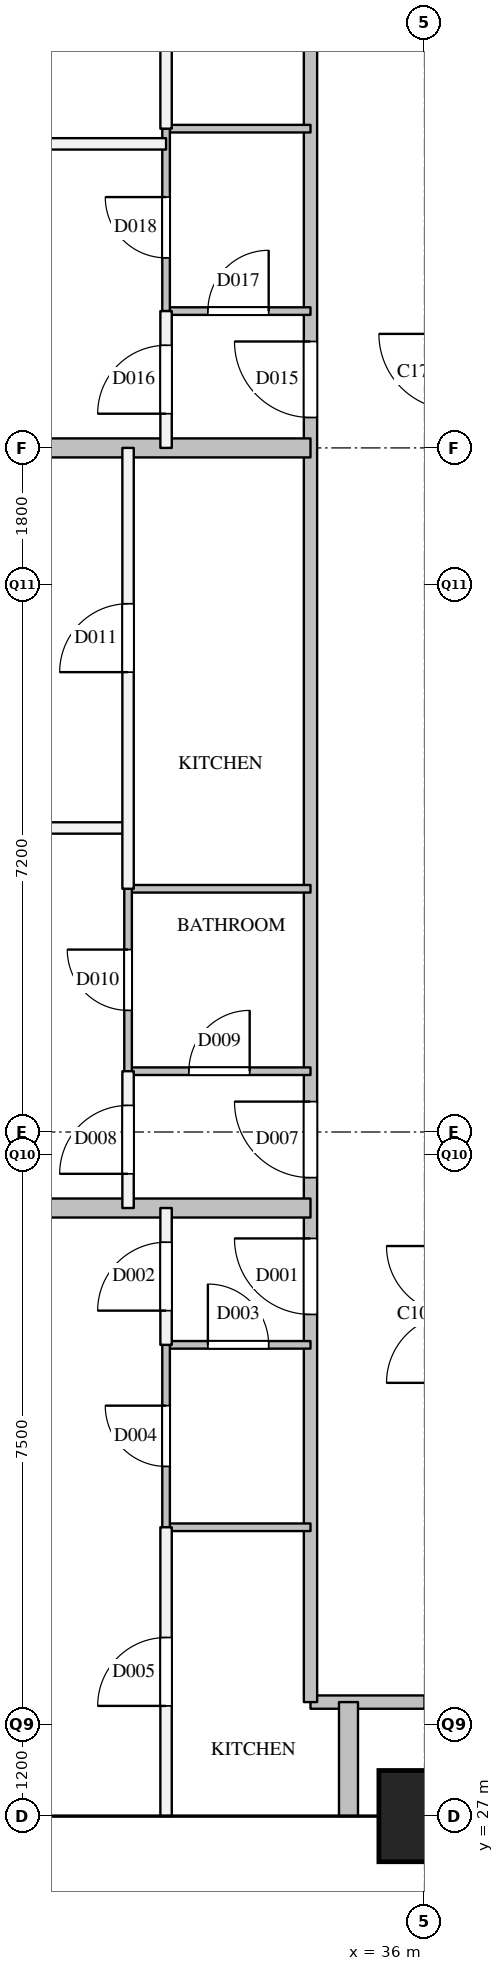
"""IFC4 building model, lengths in metres.
Left out: names, types, materials, properties, quantities, classifications, styles, units other than length and angle.
Written with IfcOpenShell. Run it as: python <this file> out.ifc"""

import sys

from ifc_helpers import new_model, si_unit, direction, frame, frame_2d, origin, origin_2d, place, context, subcontext, project, spatial, rectangle, extrude, element, fill, save


model = new_model("IFC4")
c1 = context("Model", 3, precision=1e-05, world=origin(), true_north=direction((0.0, 1.0)))
c2 = subcontext(c1, "Body", "Model", "MODEL_VIEW")
j1 = project(units=[si_unit("LENGTHUNIT", "METRE"), si_unit("PLANEANGLEUNIT", "RADIAN")], contexts=[c1])
p1 = place(None, origin())
s1 = spatial("IfcSite", under=j1, at=p1, CompositionType="ELEMENT")
p2 = place(p1, origin())
s2 = spatial("IfcBuilding", under=s1, at=p2, CompositionType="ELEMENT")
p3 = place(p2, frame((0.0, 0.0, 242.3)))
s3 = spatial("IfcBuildingStorey", under=s2, at=p3, CompositionType="ELEMENT", Elevation=242.3)
p4 = place(p3, frame((36.0, 27.0, 0.0), z_axis=(0.0, 0.0, 1.0), x_axis=(1.0, 0.0, 0.0)))
e1 = element("IfcColumn", 1, at=p4, inside=s3, PredefinedType="COLUMN", context=c2, shape_type="SweptSolid", body=[
    extrude(rectangle(XDim=1.2, YDim=1.2, at=origin_2d()), origin(), (0.0, 0.0, 1.0), 3.9),
])
p5 = place(p3, frame((34.5, 28.5, 0.0), z_axis=(0.0, 0.0, 1.0), x_axis=(1.0, 0.0, 0.0)))
e2 = element("IfcWall", 2, at=p5, inside=s3, PredefinedType="PARTITIONING", context=c2, shape_type="SweptSolid", body=[
    extrude(rectangle(XDim=1.5, YDim=0.175, at=frame_2d((0.75, 0.0))), origin(), (0.0, 0.0, 1.0), 3.6),
])
p6 = place(p3, frame((34.5, 28.5, 0.0), z_axis=(0.0, 0.0, 1.0), x_axis=(0.0, 1.0, 0.0)))
e3 = element("IfcWall", 3, at=p6, inside=s3, PredefinedType="PARTITIONING", context=c2, shape_type="SweptSolid", body=[
    extrude(rectangle(XDim=23.0, YDim=0.175, at=frame_2d((11.5, 0.0))), origin(), (0.0, 0.0, 1.0), 3.6),
])
p7 = place(p6, frame((5.1, 0.0, 0.0)))
e4 = element("IfcOpeningElement", 4, at=p7, cuts=e3, PredefinedType="OPENING", context=c2, shape_type="SweptSolid", body=[
    extrude(rectangle(XDim=1.0, YDim=2.1, at=frame_2d((0.5, 1.05))), frame((0.0, 0.097, 0.0), z_axis=(0.0, -1.0, 0.0), x_axis=(1.0, 0.0, 0.0)), (0.0, 0.0, 1.0), 0.195),
])
p8 = place(p6, frame((6.9, 0.0, 0.0)))
e5 = element("IfcOpeningElement", 5, at=p8, cuts=e3, PredefinedType="OPENING", context=c2, shape_type="SweptSolid", body=[
    extrude(rectangle(XDim=1.0, YDim=2.1, at=frame_2d((0.5, 1.05))), frame((0.0, 0.097, 0.0), z_axis=(0.0, -1.0, 0.0), x_axis=(1.0, 0.0, 0.0)), (0.0, 0.0, 1.0), 0.195),
])
p9 = place(p6, frame((16.9, 0.0, 0.0)))
e6 = element("IfcOpeningElement", 6, at=p9, cuts=e3, PredefinedType="OPENING", context=c2, shape_type="SweptSolid", body=[
    extrude(rectangle(XDim=1.0, YDim=2.1, at=frame_2d((0.5, 1.05))), frame((0.0, 0.097, 0.0), z_axis=(0.0, -1.0, 0.0), x_axis=(1.0, 0.0, 0.0)), (0.0, 0.0, 1.0), 0.195),
])
p10 = place(p3, frame((18.0, 40.0, 0.0), z_axis=(0.0, 0.0, 1.0), x_axis=(1.0, 0.0, 0.0)))
e7 = element("IfcWall", 7, at=p10, inside=s3, PredefinedType="PARTITIONING", context=c2, shape_type="SweptSolid", body=[
    extrude(rectangle(XDim=14.1, YDim=0.15, at=frame_2d((7.05, 0.0))), origin(), (0.0, 0.0, 1.0), 2.6),
])
p11 = place(p10, frame((9.914, 0.0, 0.0)))
e8 = element("IfcOpeningElement", 8, at=p11, cuts=e7, PredefinedType="OPENING", context=c2, shape_type="SweptSolid", body=[
    extrude(rectangle(XDim=0.9, YDim=2.1, at=frame_2d((0.45, 1.05))), frame((0.0, 0.085, 0.0), z_axis=(0.0, -1.0, 0.0), x_axis=(1.0, 0.0, 0.0)), (0.0, 0.0, 1.0), 0.17),
])
p12 = place(p10, frame((2.864, 0.0, 0.0)))
e9 = element("IfcOpeningElement", 9, at=p12, cuts=e7, PredefinedType="OPENING", context=c2, shape_type="SweptSolid", body=[
    extrude(rectangle(XDim=0.9, YDim=2.1, at=frame_2d((0.45, 1.05))), frame((0.0, 0.085, 0.0), z_axis=(0.0, -1.0, 0.0), x_axis=(1.0, 0.0, 0.0)), (0.0, 0.0, 1.0), 0.17),
])
p13 = place(p3, frame((18.0, 49.0, 0.0), z_axis=(0.0, 0.0, 1.0), x_axis=(1.0, 0.0, 0.0)))
e10 = element("IfcWall", 10, at=p13, inside=s3, PredefinedType="PARTITIONING", context=c2, shape_type="SweptSolid", body=[
    extrude(rectangle(XDim=14.6, YDim=0.15, at=frame_2d((7.3, 0.0))), origin(), (0.0, 0.0, 1.0), 2.6),
])
p14 = place(p13, frame((10.533, 0.0, 0.0)))
e11 = element("IfcOpeningElement", 11, at=p14, cuts=e10, PredefinedType="OPENING", context=c2, shape_type="SweptSolid", body=[
    extrude(rectangle(XDim=0.9, YDim=2.1, at=frame_2d((0.45, 1.05))), frame((0.0, 0.085, 0.0), z_axis=(0.0, -1.0, 0.0), x_axis=(1.0, 0.0, 0.0)), (0.0, 0.0, 1.0), 0.17),
])
p15 = place(p13, frame((3.233, 0.0, 0.0)))
e12 = element("IfcOpeningElement", 12, at=p15, cuts=e10, PredefinedType="OPENING", context=c2, shape_type="SweptSolid", body=[
    extrude(rectangle(XDim=0.9, YDim=2.1, at=frame_2d((0.45, 1.05))), frame((0.0, 0.085, 0.0), z_axis=(0.0, -1.0, 0.0), x_axis=(1.0, 0.0, 0.0)), (0.0, 0.0, 1.0), 0.17),
])
p16 = place(p3, frame((32.1, 35.0, 0.0), z_axis=(0.0, 0.0, 1.0), x_axis=(0.0, 1.0, 0.0)))
e13 = element("IfcWall", 13, at=p16, inside=s3, PredefinedType="PARTITIONING", context=c2, shape_type="SweptSolid", body=[
    extrude(rectangle(XDim=1.8, YDim=0.15, at=frame_2d((0.9, 0.0))), origin(), (0.0, 0.0, 1.0), 3.6),
])
p17 = place(p16, frame((0.45, 0.0, 0.0)))
e14 = element("IfcOpeningElement", 14, at=p17, cuts=e13, PredefinedType="OPENING", context=c2, shape_type="SweptSolid", body=[
    extrude(rectangle(XDim=0.9, YDim=2.1, at=frame_2d((0.45, 1.05))), frame((0.0, 0.085, 0.0), z_axis=(0.0, -1.0, 0.0), x_axis=(1.0, 0.0, 0.0)), (0.0, 0.0, 1.0), 0.17),
])
p18 = place(p3, frame((32.1, 39.2, 0.0), z_axis=(0.0, 0.0, 1.0), x_axis=(0.0, 1.0, 0.0)))
e15 = element("IfcWall", 15, at=p18, inside=s3, PredefinedType="PARTITIONING", context=c2, shape_type="SweptSolid", body=[
    extrude(rectangle(XDim=5.8, YDim=0.15, at=frame_2d((2.9, 0.0))), origin(), (0.0, 0.0, 1.0), 3.6),
])
p19 = place(p18, frame((2.85, 0.0, 0.0)))
e16 = element("IfcOpeningElement", 16, at=p19, cuts=e15, PredefinedType="OPENING", context=c2, shape_type="SweptSolid", body=[
    extrude(rectangle(XDim=0.9, YDim=2.1, at=frame_2d((0.45, 1.05))), frame((0.0, 0.085, 0.0), z_axis=(0.0, -1.0, 0.0), x_axis=(1.0, 0.0, 0.0)), (0.0, 0.0, 1.0), 0.17),
])
p20 = place(p3, frame((32.6, 27.0, 0.0), z_axis=(0.0, 0.0, 1.0), x_axis=(0.0, 1.0, 0.0)))
e17 = element("IfcWall", 17, at=p20, inside=s3, PredefinedType="PARTITIONING", context=c2, shape_type="SweptSolid", body=[
    extrude(rectangle(XDim=3.8, YDim=0.15, at=frame_2d((1.9, 0.0))), origin(), (0.0, 0.0, 1.0), 2.6),
])
p21 = place(p20, frame((1.45, 0.0, 0.0)))
e18 = element("IfcOpeningElement", 18, at=p21, cuts=e17, PredefinedType="OPENING", context=c2, shape_type="SweptSolid", body=[
    extrude(rectangle(XDim=0.9, YDim=2.1, at=frame_2d((0.45, 1.05))), frame((0.0, 0.085, 0.0), z_axis=(0.0, -1.0, 0.0), x_axis=(1.0, 0.0, 0.0)), (0.0, 0.0, 1.0), 0.17),
])
p22 = place(p3, frame((32.6, 33.2, 0.0), z_axis=(0.0, 0.0, 1.0), x_axis=(0.0, 1.0, 0.0)))
e19 = element("IfcWall", 19, at=p22, inside=s3, PredefinedType="PARTITIONING", context=c2, shape_type="SweptSolid", body=[
    extrude(rectangle(XDim=1.8, YDim=0.15, at=frame_2d((0.9, 0.0))), origin(), (0.0, 0.0, 1.0), 3.6),
])
p23 = place(p22, frame((0.45, 0.0, 0.0)))
e20 = element("IfcOpeningElement", 20, at=p23, cuts=e19, PredefinedType="OPENING", context=c2, shape_type="SweptSolid", body=[
    extrude(rectangle(XDim=0.9, YDim=2.1, at=frame_2d((0.45, 1.05))), frame((0.0, 0.085, 0.0), z_axis=(0.0, -1.0, 0.0), x_axis=(1.0, 0.0, 0.0)), (0.0, 0.0, 1.0), 0.17),
])
p24 = place(p3, frame((32.6, 45.0, 0.0), z_axis=(0.0, 0.0, 1.0), x_axis=(0.0, 1.0, 0.0)))
e21 = element("IfcWall", 21, at=p24, inside=s3, PredefinedType="PARTITIONING", context=c2, shape_type="SweptSolid", body=[
    extrude(rectangle(XDim=1.8, YDim=0.15, at=frame_2d((0.9, 0.0))), origin(), (0.0, 0.0, 1.0), 3.6),
])
p25 = place(p24, frame((0.45, 0.0, 0.0)))
e22 = element("IfcOpeningElement", 22, at=p25, cuts=e21, PredefinedType="OPENING", context=c2, shape_type="SweptSolid", body=[
    extrude(rectangle(XDim=0.9, YDim=2.1, at=frame_2d((0.45, 1.05))), frame((0.0, 0.085, 0.0), z_axis=(0.0, -1.0, 0.0), x_axis=(1.0, 0.0, 0.0)), (0.0, 0.0, 1.0), 0.17),
])
p26 = place(p3, frame((32.6, 49.2, 0.0), z_axis=(0.0, 0.0, 1.0), x_axis=(0.0, 1.0, 0.0)))
e23 = element("IfcWall", 23, at=p26, inside=s3, PredefinedType="PARTITIONING", context=c2, shape_type="SweptSolid", body=[
    extrude(rectangle(XDim=4.8, YDim=0.15, at=frame_2d((2.4, 0.0))), origin(), (0.0, 0.0, 1.0), 2.6),
])
p27 = place(p26, frame((1.95, 0.0, 0.0)))
e24 = element("IfcOpeningElement", 24, at=p27, cuts=e23, PredefinedType="OPENING", context=c2, shape_type="SweptSolid", body=[
    extrude(rectangle(XDim=0.9, YDim=2.1, at=frame_2d((0.45, 1.05))), frame((0.0, 0.085, 0.0), z_axis=(0.0, -1.0, 0.0), x_axis=(1.0, 0.0, 0.0)), (0.0, 0.0, 1.0), 0.17),
])
p28 = place(p3, frame((18.0, 35.0, 0.0), z_axis=(0.0, 0.0, 1.0), x_axis=(1.0, 0.0, 0.0)))
e25 = element("IfcWall", 25, at=p28, inside=s3, PredefinedType="PARTITIONING", context=c2, shape_type="SweptSolid", body=[
    extrude(rectangle(XDim=16.5, YDim=0.25, at=frame_2d((8.25, 0.0))), origin(), (0.0, 0.0, 1.0), 2.6),
])
p29 = place(p3, frame((18.0, 45.0, 0.0), z_axis=(0.0, 0.0, 1.0), x_axis=(1.0, 0.0, 0.0)))
e26 = element("IfcWall", 26, at=p29, inside=s3, PredefinedType="PARTITIONING", context=c2, shape_type="SweptSolid", body=[
    extrude(rectangle(XDim=16.5, YDim=0.25, at=frame_2d((8.25, 0.0))), origin(), (0.0, 0.0, 1.0), 3.6),
])
p30 = place(p3, frame((35.0, 27.0, 0.0), z_axis=(0.0, 0.0, 1.0), x_axis=(0.0, 1.0, 0.0)))
e27 = element("IfcWall", 27, at=p30, inside=s3, PredefinedType="PARTITIONING", context=c2, shape_type="SweptSolid", body=[
    extrude(rectangle(XDim=1.5, YDim=0.25, at=frame_2d((0.75, 0.0))), origin(), (0.0, 0.0, 1.0), 2.6),
])
p31 = place(p3, frame((32.6, 30.8, 0.0), z_axis=(0.0, 0.0, 1.0), x_axis=(1.0, 0.0, 0.0)))
e28 = element("IfcWall", 28, at=p31, inside=s3, PredefinedType="PARTITIONING", context=c2, shape_type="SweptSolid", body=[
    extrude(rectangle(XDim=1.9, YDim=0.1, at=frame_2d((0.95, 0.0))), origin(), (0.0, 0.0, 1.0), 3.6),
])
p32 = place(p3, frame((32.6, 33.2, 0.0), z_axis=(0.0, 0.0, 1.0), x_axis=(1.0, 0.0, 0.0)))
e29 = element("IfcWall", 29, at=p32, inside=s3, PredefinedType="PARTITIONING", context=c2, shape_type="SweptSolid", body=[
    extrude(rectangle(XDim=1.9, YDim=0.1, at=frame_2d((0.95, 0.0))), origin(), (0.0, 0.0, 1.0), 3.6),
])
p33 = place(p32, frame((0.55, 0.0, 0.0)))
e30 = element("IfcOpeningElement", 30, at=p33, cuts=e29, PredefinedType="OPENING", context=c2, shape_type="SweptSolid", body=[
    extrude(rectangle(XDim=0.8, YDim=2.1, at=frame_2d((0.4, 1.05))), frame((0.0, 0.06, 0.0), z_axis=(0.0, -1.0, 0.0), x_axis=(1.0, 0.0, 0.0)), (0.0, 0.0, 1.0), 0.12),
])
p34 = place(p3, frame((32.1, 36.8, 0.0), z_axis=(0.0, 0.0, 1.0), x_axis=(1.0, 0.0, 0.0)))
e31 = element("IfcWall", 31, at=p34, inside=s3, PredefinedType="PARTITIONING", context=c2, shape_type="SweptSolid", body=[
    extrude(rectangle(XDim=2.4, YDim=0.1, at=frame_2d((1.2, 0.0))), origin(), (0.0, 0.0, 1.0), 3.6),
])
p35 = place(p34, frame((0.8, 0.0, 0.0)))
e32 = element("IfcOpeningElement", 32, at=p35, cuts=e31, PredefinedType="OPENING", context=c2, shape_type="SweptSolid", body=[
    extrude(rectangle(XDim=0.8, YDim=2.1, at=frame_2d((0.4, 1.05))), frame((0.0, 0.06, 0.0), z_axis=(0.0, -1.0, 0.0), x_axis=(1.0, 0.0, 0.0)), (0.0, 0.0, 1.0), 0.12),
])
p36 = place(p3, frame((32.1, 39.2, 0.0), z_axis=(0.0, 0.0, 1.0), x_axis=(1.0, 0.0, 0.0)))
e33 = element("IfcWall", 33, at=p36, inside=s3, PredefinedType="PARTITIONING", context=c2, shape_type="SweptSolid", body=[
    extrude(rectangle(XDim=2.4, YDim=0.1, at=frame_2d((1.2, 0.0))), origin(), (0.0, 0.0, 1.0), 3.6),
])
p37 = place(p3, frame((32.6, 46.8, 0.0), z_axis=(0.0, 0.0, 1.0), x_axis=(1.0, 0.0, 0.0)))
e34 = element("IfcWall", 34, at=p37, inside=s3, PredefinedType="PARTITIONING", context=c2, shape_type="SweptSolid", body=[
    extrude(rectangle(XDim=1.9, YDim=0.1, at=frame_2d((0.95, 0.0))), origin(), (0.0, 0.0, 1.0), 3.6),
])
p38 = place(p37, frame((0.55, 0.0, 0.0)))
e35 = element("IfcOpeningElement", 35, at=p38, cuts=e34, PredefinedType="OPENING", context=c2, shape_type="SweptSolid", body=[
    extrude(rectangle(XDim=0.8, YDim=2.1, at=frame_2d((0.4, 1.05))), frame((0.0, 0.06, 0.0), z_axis=(0.0, -1.0, 0.0), x_axis=(1.0, 0.0, 0.0)), (0.0, 0.0, 1.0), 0.12),
])
p39 = place(p3, frame((32.6, 49.2, 0.0), z_axis=(0.0, 0.0, 1.0), x_axis=(1.0, 0.0, 0.0)))
e36 = element("IfcWall", 36, at=p39, inside=s3, PredefinedType="PARTITIONING", context=c2, shape_type="SweptSolid", body=[
    extrude(rectangle(XDim=1.9, YDim=0.1, at=frame_2d((0.95, 0.0))), origin(), (0.0, 0.0, 1.0), 3.6),
])
p40 = place(p3, frame((32.1, 36.8, 0.0), z_axis=(0.0, 0.0, 1.0), x_axis=(0.0, 1.0, 0.0)))
e37 = element("IfcWall", 37, at=p40, inside=s3, PredefinedType="PARTITIONING", context=c2, shape_type="SweptSolid", body=[
    extrude(rectangle(XDim=2.4, YDim=0.1, at=frame_2d((1.2, 0.0))), origin(), (0.0, 0.0, 1.0), 3.6),
])
p41 = place(p40, frame((0.8, 0.0, 0.0)))
e38 = element("IfcOpeningElement", 38, at=p41, cuts=e37, PredefinedType="OPENING", context=c2, shape_type="SweptSolid", body=[
    extrude(rectangle(XDim=0.8, YDim=2.1, at=frame_2d((0.4, 1.05))), frame((0.0, 0.06, 0.0), z_axis=(0.0, -1.0, 0.0), x_axis=(1.0, 0.0, 0.0)), (0.0, 0.0, 1.0), 0.12),
])
p42 = place(p3, frame((32.6, 30.8, 0.0), z_axis=(0.0, 0.0, 1.0), x_axis=(0.0, 1.0, 0.0)))
e39 = element("IfcWall", 39, at=p42, inside=s3, PredefinedType="PARTITIONING", context=c2, shape_type="SweptSolid", body=[
    extrude(rectangle(XDim=2.4, YDim=0.1, at=frame_2d((1.2, 0.0))), origin(), (0.0, 0.0, 1.0), 3.6),
])
p43 = place(p42, frame((0.8, 0.0, 0.0)))
e40 = element("IfcOpeningElement", 40, at=p43, cuts=e39, PredefinedType="OPENING", context=c2, shape_type="SweptSolid", body=[
    extrude(rectangle(XDim=0.8, YDim=2.1, at=frame_2d((0.4, 1.05))), frame((0.0, 0.06, 0.0), z_axis=(0.0, -1.0, 0.0), x_axis=(1.0, 0.0, 0.0)), (0.0, 0.0, 1.0), 0.12),
])
p44 = place(p3, frame((32.6, 46.8, 0.0), z_axis=(0.0, 0.0, 1.0), x_axis=(0.0, 1.0, 0.0)))
e41 = element("IfcWall", 41, at=p44, inside=s3, PredefinedType="PARTITIONING", context=c2, shape_type="SweptSolid", body=[
    extrude(rectangle(XDim=2.4, YDim=0.1, at=frame_2d((1.2, 0.0))), origin(), (0.0, 0.0, 1.0), 3.6),
])
p45 = place(p44, frame((0.7, 0.0, 0.0)))
e42 = element("IfcOpeningElement", 42, at=p45, cuts=e41, PredefinedType="OPENING", context=c2, shape_type="SweptSolid", body=[
    extrude(rectangle(XDim=0.8, YDim=2.1, at=frame_2d((0.4, 1.05))), frame((0.0, 0.06, 0.0), z_axis=(0.0, -1.0, 0.0), x_axis=(1.0, 0.0, 0.0)), (0.0, 0.0, 1.0), 0.12),
])
p46 = place(p7, origin())
e43 = element("IfcDoor", 43, at=p46, inside=s3, OperationType="SINGLE_SWING_RIGHT", PredefinedType="DOOR", context=c2, shape_type="SweptSolid", body=[
    extrude(rectangle(XDim=1.0, YDim=2.1, at=frame_2d((0.5, 1.05))), frame((0.0, 0.025, 0.0), z_axis=(0.0, -1.0, 0.0), x_axis=(1.0, 0.0, 0.0)), (0.0, 0.0, 1.0), 0.05),
])
fill(e4, e43)
p47 = place(p23, origin())
e44 = element("IfcDoor", 44, at=p47, inside=s3, OperationType="SINGLE_SWING_LEFT", PredefinedType="DOOR", context=c2, shape_type="SweptSolid", body=[
    extrude(rectangle(XDim=0.9, YDim=2.1, at=frame_2d((0.45, 1.05))), frame((0.0, 0.025, 0.0), z_axis=(0.0, -1.0, 0.0), x_axis=(1.0, 0.0, 0.0)), (0.0, 0.0, 1.0), 0.05),
])
fill(e20, e44)
p48 = place(p33, origin())
e45 = element("IfcDoor", 45, at=p48, inside=s3, OperationType="SINGLE_SWING_LEFT", PredefinedType="DOOR", context=c2, shape_type="SweptSolid", body=[
    extrude(rectangle(XDim=0.8, YDim=2.1, at=frame_2d((0.4, 1.05))), frame((0.0, 0.025, 0.0), z_axis=(0.0, -1.0, 0.0), x_axis=(1.0, 0.0, 0.0)), (0.0, 0.0, 1.0), 0.05),
])
fill(e30, e45)
p49 = place(p43, origin())
e46 = element("IfcDoor", 46, at=p49, inside=s3, OperationType="SINGLE_SWING_RIGHT", PredefinedType="DOOR", context=c2, shape_type="SweptSolid", body=[
    extrude(rectangle(XDim=0.8, YDim=2.1, at=frame_2d((0.4, 1.05))), frame((0.0, 0.025, 0.0), z_axis=(0.0, -1.0, 0.0), x_axis=(1.0, 0.0, 0.0)), (0.0, 0.0, 1.0), 0.05),
])
fill(e40, e46)
p50 = place(p21, origin())
e47 = element("IfcDoor", 47, at=p50, inside=s3, OperationType="SINGLE_SWING_LEFT", PredefinedType="DOOR", context=c2, shape_type="SweptSolid", body=[
    extrude(rectangle(XDim=0.9, YDim=2.1, at=frame_2d((0.45, 1.05))), frame((0.0, 0.025, 0.0), z_axis=(0.0, -1.0, 0.0), x_axis=(1.0, 0.0, 0.0)), (0.0, 0.0, 1.0), 0.05),
])
fill(e18, e47)
p51 = place(p8, origin())
e48 = element("IfcDoor", 48, at=p51, inside=s3, OperationType="SINGLE_SWING_RIGHT", PredefinedType="DOOR", context=c2, shape_type="SweptSolid", body=[
    extrude(rectangle(XDim=1.0, YDim=2.1, at=frame_2d((0.5, 1.05))), frame((0.0, 0.025, 0.0), z_axis=(0.0, -1.0, 0.0), x_axis=(1.0, 0.0, 0.0)), (0.0, 0.0, 1.0), 0.05),
])
fill(e5, e48)
p52 = place(p17, origin())
e49 = element("IfcDoor", 49, at=p52, inside=s3, OperationType="SINGLE_SWING_LEFT", PredefinedType="DOOR", context=c2, shape_type="SweptSolid", body=[
    extrude(rectangle(XDim=0.9, YDim=2.1, at=frame_2d((0.45, 1.05))), frame((0.0, 0.025, 0.0), z_axis=(0.0, -1.0, 0.0), x_axis=(1.0, 0.0, 0.0)), (0.0, 0.0, 1.0), 0.05),
])
fill(e14, e49)
p53 = place(p35, origin())
e50 = element("IfcDoor", 50, at=p53, inside=s3, OperationType="SINGLE_SWING_RIGHT", PredefinedType="DOOR", context=c2, shape_type="SweptSolid", body=[
    extrude(rectangle(XDim=0.8, YDim=2.1, at=frame_2d((0.4, 1.05))), frame((0.0, 0.025, 0.0), z_axis=(0.0, -1.0, 0.0), x_axis=(1.0, 0.0, 0.0)), (0.0, 0.0, 1.0), 0.05),
])
fill(e32, e50)
p54 = place(p41, origin())
e51 = element("IfcDoor", 51, at=p54, inside=s3, OperationType="SINGLE_SWING_RIGHT", PredefinedType="DOOR", context=c2, shape_type="SweptSolid", body=[
    extrude(rectangle(XDim=0.8, YDim=2.1, at=frame_2d((0.4, 1.05))), frame((0.0, 0.025, 0.0), z_axis=(0.0, -1.0, 0.0), x_axis=(1.0, 0.0, 0.0)), (0.0, 0.0, 1.0), 0.05),
])
fill(e38, e51)
p55 = place(p19, origin())
e52 = element("IfcDoor", 52, at=p55, inside=s3, OperationType="SINGLE_SWING_LEFT", PredefinedType="DOOR", context=c2, shape_type="SweptSolid", body=[
    extrude(rectangle(XDim=0.9, YDim=2.1, at=frame_2d((0.45, 1.05))), frame((0.0, 0.025, 0.0), z_axis=(0.0, -1.0, 0.0), x_axis=(1.0, 0.0, 0.0)), (0.0, 0.0, 1.0), 0.05),
])
fill(e16, e52)
p56 = place(p9, origin())
e53 = element("IfcDoor", 53, at=p56, inside=s3, OperationType="SINGLE_SWING_RIGHT", PredefinedType="DOOR", context=c2, shape_type="SweptSolid", body=[
    extrude(rectangle(XDim=1.0, YDim=2.1, at=frame_2d((0.5, 1.05))), frame((0.0, 0.025, 0.0), z_axis=(0.0, -1.0, 0.0), x_axis=(1.0, 0.0, 0.0)), (0.0, 0.0, 1.0), 0.05),
])
fill(e6, e53)
p57 = place(p25, origin())
e54 = element("IfcDoor", 54, at=p57, inside=s3, OperationType="SINGLE_SWING_LEFT", PredefinedType="DOOR", context=c2, shape_type="SweptSolid", body=[
    extrude(rectangle(XDim=0.9, YDim=2.1, at=frame_2d((0.45, 1.05))), frame((0.0, 0.025, 0.0), z_axis=(0.0, -1.0, 0.0), x_axis=(1.0, 0.0, 0.0)), (0.0, 0.0, 1.0), 0.05),
])
fill(e22, e54)
p58 = place(p38, origin())
e55 = element("IfcDoor", 55, at=p58, inside=s3, OperationType="SINGLE_SWING_RIGHT", PredefinedType="DOOR", context=c2, shape_type="SweptSolid", body=[
    extrude(rectangle(XDim=0.8, YDim=2.1, at=frame_2d((0.4, 1.05))), frame((0.0, 0.025, 0.0), z_axis=(0.0, -1.0, 0.0), x_axis=(1.0, 0.0, 0.0)), (0.0, 0.0, 1.0), 0.05),
])
fill(e35, e55)
p59 = place(p45, origin())
e56 = element("IfcDoor", 56, at=p59, inside=s3, OperationType="SINGLE_SWING_RIGHT", PredefinedType="DOOR", context=c2, shape_type="SweptSolid", body=[
    extrude(rectangle(XDim=0.8, YDim=2.1, at=frame_2d((0.4, 1.05))), frame((0.0, 0.025, 0.0), z_axis=(0.0, -1.0, 0.0), x_axis=(1.0, 0.0, 0.0)), (0.0, 0.0, 1.0), 0.05),
])
fill(e42, e56)
save(model, sys.argv[1])
